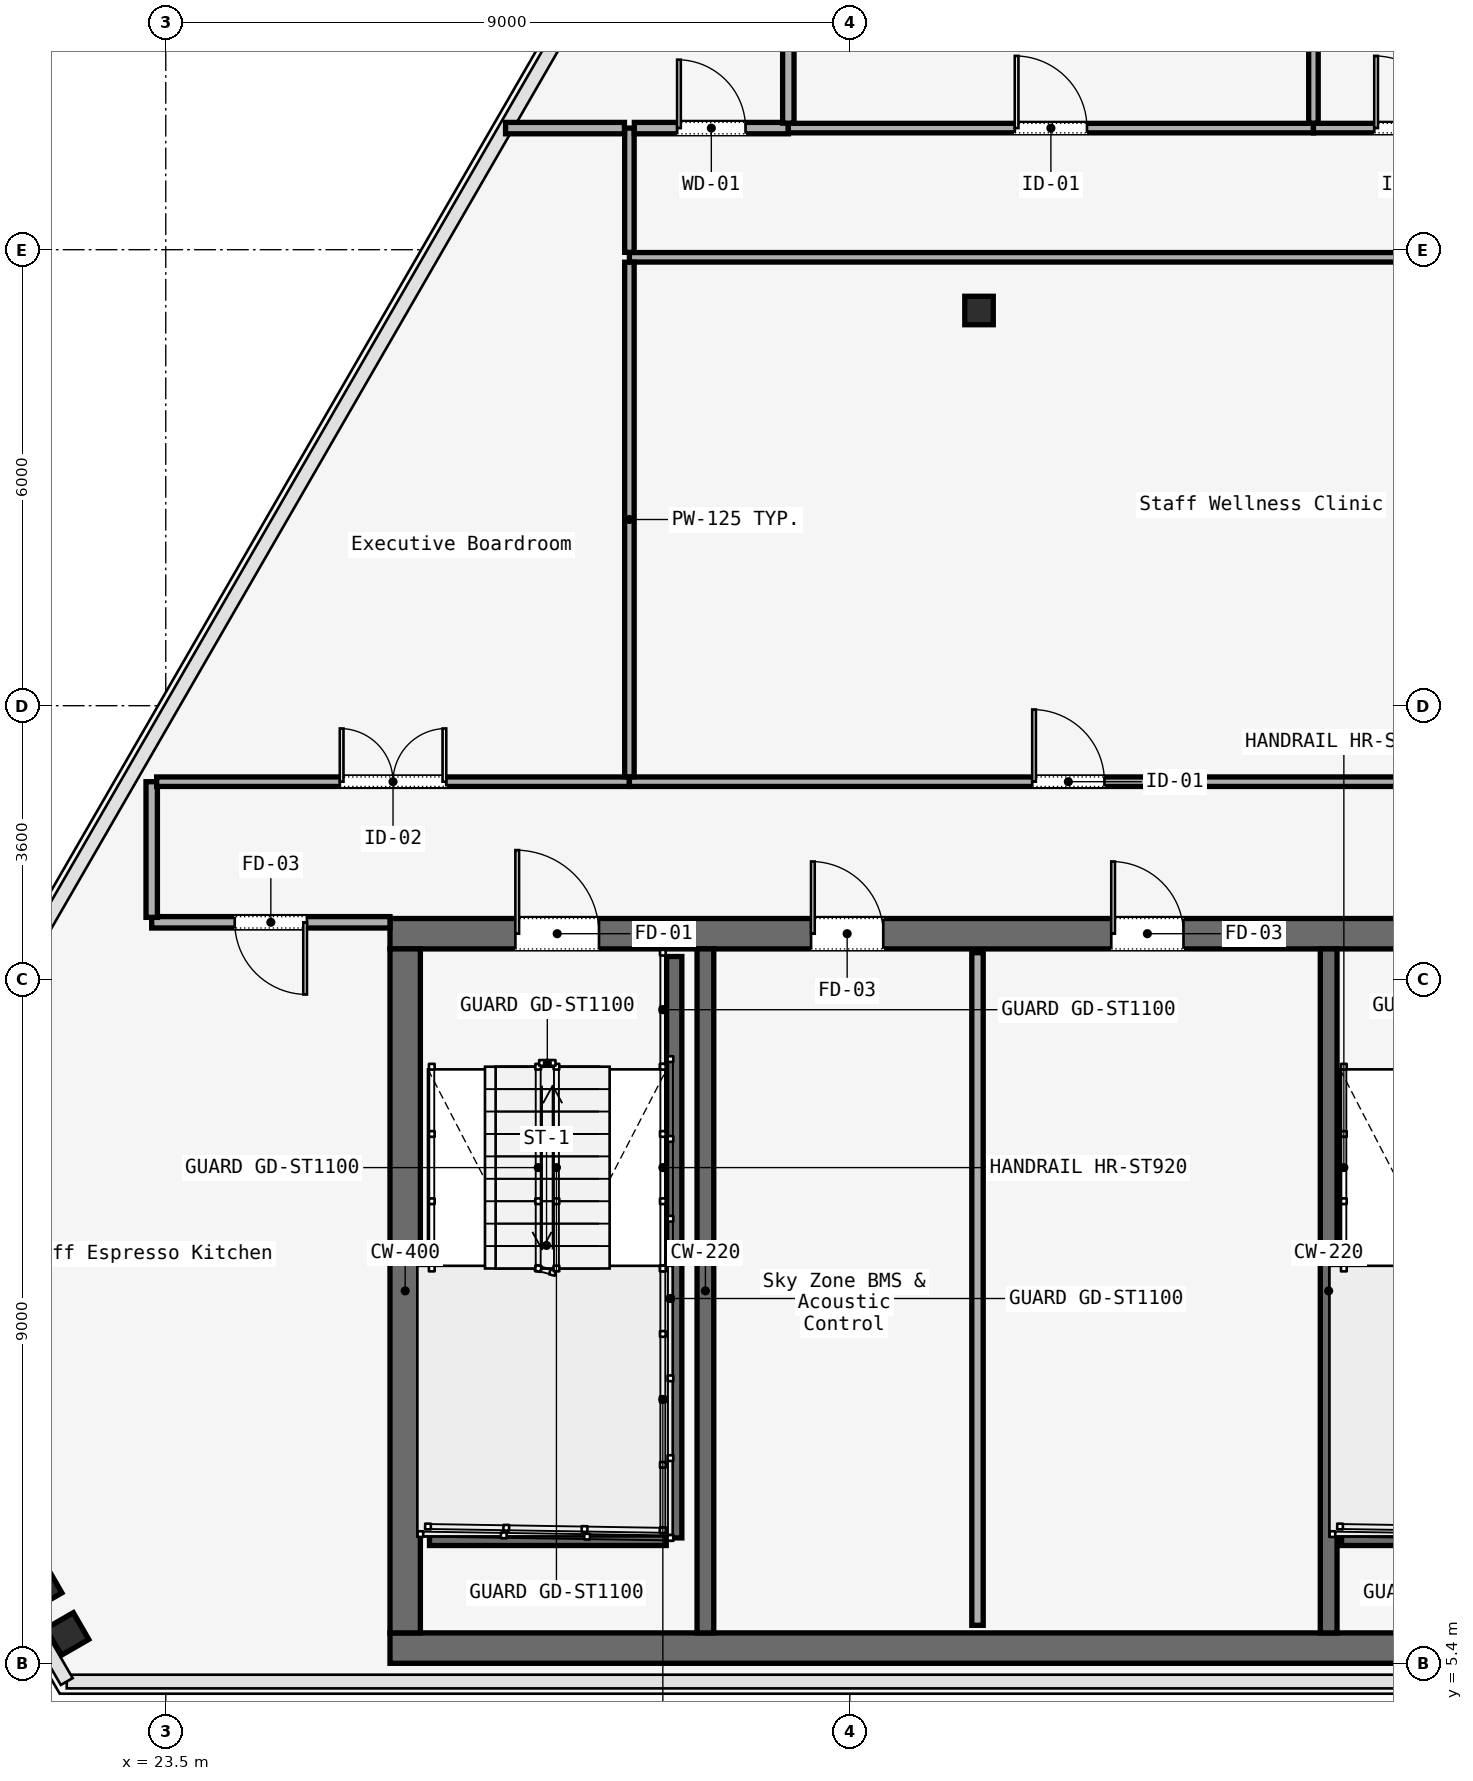
"""IFC4 building model, lengths in metres.
Left out: names, types, materials, properties, quantities, classifications, styles, units other than length and angle.
Written with IfcOpenShell. Run it as: python <this file> out.ifc"""

import sys

from ifc_helpers import new_model, si_unit, direction, frame, frame_2d, origin, origin_2d, place, context, subcontext, project, spatial, rectangle, i_section, extrude, element, fill, save


model = new_model("IFC4")
c1 = context("Model", 3, precision=1e-05, world=origin(), true_north=direction((0.0, 1.0)))
c2 = subcontext(c1, "Body", "Model", "MODEL_VIEW")
j1 = project(units=[si_unit("LENGTHUNIT", "METRE"), si_unit("PLANEANGLEUNIT", "RADIAN")], contexts=[c1])
p1 = place(None, origin())
s1 = spatial("IfcSite", under=j1, at=p1, CompositionType="ELEMENT")
p2 = place(p1, origin())
s2 = spatial("IfcBuilding", under=s1, at=p2, CompositionType="ELEMENT")
p3 = place(p2, frame((0.0, 0.0, 259.8)))
s3 = spatial("IfcBuildingStorey", under=s2, at=p3, CompositionType="ELEMENT", Elevation=259.8)
p4 = place(p3, frame((26.45, 15.0, 0.0), z_axis=(0.0, 0.0, 1.0), x_axis=(1.0, 0.0, 0.0)))
e1 = element("IfcWall", 1, at=p4, inside=s3, PredefinedType="SOLIDWALL", context=c2, shape_type="SweptSolid", body=[
    extrude(rectangle(XDim=31.1, YDim=0.4, at=frame_2d((15.55, 0.0))), origin(), (0.0, 0.0, 1.0), 3.58),
])
p5 = place(p4, frame((1.65, 0.0, 0.0)))
e2 = element("IfcOpeningElement", 2, at=p5, cuts=e1, PredefinedType="OPENING", context=c2, shape_type="SweptSolid", body=[
    extrude(rectangle(XDim=1.1, YDim=2.2, at=frame_2d((0.55, 1.1))), frame((0.0, 0.2, 0.0), z_axis=(0.0, -1.0, 0.0), x_axis=(1.0, 0.0, 0.0)), (0.0, 0.0, 1.0), 0.4),
])
p6 = place(p4, frame((13.65, 0.0, 0.0)))
e3 = element("IfcOpeningElement", 3, at=p6, cuts=e1, PredefinedType="OPENING", context=c2, shape_type="SweptSolid", body=[
    extrude(rectangle(XDim=1.1, YDim=2.2, at=frame_2d((0.55, 1.1))), frame((0.0, 0.2, 0.0), z_axis=(0.0, -1.0, 0.0), x_axis=(1.0, 0.0, 0.0)), (0.0, 0.0, 1.0), 0.4),
])
p7 = place(p4, frame((25.55, 0.0, 0.0)))
e4 = element("IfcOpeningElement", 4, at=p7, cuts=e1, PredefinedType="OPENING", context=c2, shape_type="SweptSolid", body=[
    extrude(rectangle(XDim=1.1, YDim=2.2, at=frame_2d((0.55, 1.1))), frame((0.0, 0.2, 0.0), z_axis=(0.0, -1.0, 0.0), x_axis=(1.0, 0.0, 0.0)), (0.0, 0.0, 1.0), 0.4),
])
p8 = place(p4, frame((19.35, 0.0, 0.0)))
e5 = element("IfcOpeningElement", 5, at=p8, cuts=e1, PredefinedType="OPENING", context=c2, shape_type="SweptSolid", body=[
    extrude(rectangle(XDim=1.1, YDim=2.2, at=frame_2d((0.55, 1.1))), frame((0.0, 0.2, 0.0), z_axis=(0.0, -1.0, 0.0), x_axis=(1.0, 0.0, 0.0)), (0.0, 0.0, 1.0), 0.4),
])
p9 = place(p4, frame((21.4, 0.0, 0.0)))
e6 = element("IfcOpeningElement", 6, at=p9, cuts=e1, PredefinedType="OPENING", context=c2, shape_type="SweptSolid", body=[
    extrude(rectangle(XDim=0.9, YDim=2.1, at=frame_2d((0.45, 1.05))), frame((0.0, 0.2, 0.0), z_axis=(0.0, -1.0, 0.0), x_axis=(1.0, 0.0, 0.0)), (0.0, 0.0, 1.0), 0.4),
])
p10 = place(p4, frame((5.54, 0.0, 0.0)))
e7 = element("IfcOpeningElement", 7, at=p10, cuts=e1, PredefinedType="OPENING", context=c2, shape_type="SweptSolid", body=[
    extrude(rectangle(XDim=0.95, YDim=2.2, at=frame_2d((0.475, 1.1))), frame((0.0, 0.2, 0.0), z_axis=(0.0, -1.0, 0.0), x_axis=(1.0, 0.0, 0.0)), (0.0, 0.0, 1.0), 0.4),
])
p11 = place(p4, frame((9.49, 0.0, 0.0)))
e8 = element("IfcOpeningElement", 8, at=p11, cuts=e1, PredefinedType="OPENING", context=c2, shape_type="SweptSolid", body=[
    extrude(rectangle(XDim=0.95, YDim=2.2, at=frame_2d((0.475, 1.1))), frame((0.0, 0.2, 0.0), z_axis=(0.0, -1.0, 0.0), x_axis=(1.0, 0.0, 0.0)), (0.0, 0.0, 1.0), 0.4),
])
p12 = place(p4, frame((23.35, 0.0, 0.0)))
e9 = element("IfcOpeningElement", 9, at=p12, cuts=e1, PredefinedType="OPENING", context=c2, shape_type="SweptSolid", body=[
    extrude(rectangle(XDim=1.3, YDim=2.3, at=frame_2d((0.65, 1.15))), frame((0.0, 0.2, 0.0), z_axis=(0.0, -1.0, 0.0), x_axis=(1.0, 0.0, 0.0)), (0.0, 0.0, 1.0), 0.4),
])
p13 = place(p3, frame((26.45, 5.6, 0.0), z_axis=(0.0, 0.0, 1.0), x_axis=(1.0, 0.0, 0.0)))
e10 = element("IfcWall", 10, at=p13, inside=s3, PredefinedType="SOLIDWALL", context=c2, shape_type="SweptSolid", body=[
    extrude(rectangle(XDim=31.1, YDim=0.4, at=frame_2d((15.55, 0.0))), origin(), (0.0, 0.0, 1.0), 3.58),
])
p14 = place(p3, frame((26.65, 5.8, 0.0), z_axis=(0.0, 0.0, 1.0), x_axis=(0.0, 1.0, 0.0)))
e11 = element("IfcWall", 11, at=p14, inside=s3, PredefinedType="SOLIDWALL", context=c2, shape_type="SweptSolid", body=[
    extrude(rectangle(XDim=9.0, YDim=0.4, at=frame_2d((4.5, 0.0))), origin(), (0.0, 0.0, 1.0), 3.58),
])
for number, where, z_axis, x_axis in (
    (12, (30.6, 5.8, 0.0), (0.0, 0.0, 1.0), (0.0, 1.0, 0.0)),
    (13, (38.8, 5.8, 0.0), (0.0, 0.0, 1.0), (0.0, 1.0, 0.0)),
):
    element("IfcWall", number, at=place(p3, frame(where, z_axis=z_axis, x_axis=x_axis)), inside=s3, PredefinedType="SOLIDWALL", context=c2, shape_type="SweptSolid", body=[
        extrude(rectangle(XDim=9.0, YDim=0.22, at=frame_2d((4.5, 0.0))), origin(), (0.0, 0.0, 1.0), 3.58),
    ])
p15 = place(p3, frame((34.2, 23.2, 0.0), z_axis=(0.0, 0.0, 1.0), x_axis=(1.0, 0.0, 0.0)))
e14 = element("IfcColumn", 14, at=p15, inside=s3, PredefinedType="COLUMN", context=c2, shape_type="SweptSolid", body=[
    extrude(i_section(OverallWidth=0.375, OverallDepth=0.375, WebThickness=0.017, FlangeThickness=0.027, FilletRadius=0.015, at=origin_2d()), origin(), (0.0, 0.0, 1.0), 3.58),
])
p16 = place(p3, frame((21.851, 6.399, 0.0), z_axis=(-0.012543459199, -0.025700457164, 0.999590990422), x_axis=(-0.069645069236, 0.997264345813, 0.024766689329)))
e15 = element("IfcColumn", 15, at=p16, inside=s3, PredefinedType="COLUMN", context=c2, shape_type="SweptSolid", body=[
    extrude(i_section(OverallWidth=0.406, OverallDepth=0.416, WebThickness=0.03, FlangeThickness=0.037, FilletRadius=0.015, at=origin_2d()), origin(), (0.0, 0.0, 1.0), 3.581),
])
p17 = place(p3, frame((22.205, 5.786, 0.0), z_axis=(-0.022499111872, -0.008522390861, 0.999710537515), x_axis=(0.632523877391, 0.774260559272, 0.020835807778)))
e16 = element("IfcColumn", 16, at=p17, inside=s3, PredefinedType="COLUMN", context=c2, shape_type="SweptSolid", body=[
    extrude(i_section(OverallWidth=0.406, OverallDepth=0.416, WebThickness=0.03, FlangeThickness=0.037, FilletRadius=0.015, at=origin_2d()), origin(), (0.0, 0.0, 1.0), 3.581),
])
p18 = place(p3, frame((30.19, 14.7, 0.0), z_axis=(0.0, 0.0, 1.0), x_axis=(0.0, -1.0, 0.0)))
e17 = element("IfcWall", 17, at=p18, inside=s3, PredefinedType="SOLIDWALL", context=c2, shape_type="SweptSolid", body=[
    extrude(rectangle(XDim=7.65, YDim=0.2, at=frame_2d((3.825, 0.0))), origin(), (0.0, 0.0, 1.0), 3.8),
])
for number, where, z_axis, x_axis in (
    (18, (26.97, 7.05, 0.0), (0.0, 0.0, 1.0), (1.0, 0.0, 0.0)),
    (19, (38.97, 7.05, 0.0), (0.0, 0.0, 1.0), (1.0, 0.0, 0.0)),
):
    element("IfcWall", number, at=place(p3, frame(where, z_axis=z_axis, x_axis=x_axis)), inside=s3, PredefinedType="SOLIDWALL", context=c2, shape_type="SweptSolid", body=[
        extrude(rectangle(XDim=3.115, YDim=0.2, at=frame_2d((1.558, 0.0))), origin(), (0.0, 0.0, 1.0), 3.8),
    ])
p19 = place(p3, frame((34.18, 5.9, 0.0), z_axis=(0.0, 0.0, 1.0), x_axis=(0.0, 1.0, 0.0)))
e20 = element("IfcWall", 20, at=p19, inside=s3, PredefinedType="PARTITIONING", context=c2, shape_type="SweptSolid", body=[
    extrude(rectangle(XDim=8.85, YDim=0.15, at=frame_2d((4.425, 0.0))), origin(), (0.0, 0.0, 1.0), 3.01),
])
p20 = place(p3, frame((26.45, 15.15, 0.0), z_axis=(0.0, 0.0, 1.0), x_axis=(-1.0, 0.0, 0.0)))
e21 = element("IfcWall", 21, at=p20, inside=s3, PredefinedType="PARTITIONING", context=c2, shape_type="SweptSolid", body=[
    extrude(rectangle(XDim=3.135, YDim=0.15, at=frame_2d((1.567, 0.0))), origin(), (0.0, 0.0, 1.0), 3.01),
])
p21 = place(p20, frame((1.093, 0.0, 0.0)))
e22 = element("IfcOpeningElement", 22, at=p21, cuts=e21, PredefinedType="OPENING", context=c2, shape_type="SweptSolid", body=[
    extrude(rectangle(XDim=0.95, YDim=2.2, at=frame_2d((0.475, 1.1))), frame((0.0, 0.075, 0.0), z_axis=(0.0, -1.0, 0.0), x_axis=(1.0, 0.0, 0.0)), (0.0, 0.0, 1.0), 0.15),
])
p22 = place(p3, frame((23.315, 15.215, 0.0), z_axis=(0.0, 0.0, 1.0), x_axis=(0.0, 1.0, 0.0)))
e23 = element("IfcWall", 23, at=p22, inside=s3, PredefinedType="PARTITIONING", context=c2, shape_type="SweptSolid", body=[
    extrude(rectangle(XDim=1.785, YDim=0.15, at=frame_2d((0.893, 0.0))), origin(), (0.0, 0.0, 1.0), 3.01),
])
p23 = place(p3, frame((23.38, 17.0, 0.0), z_axis=(0.0, 0.0, 1.0), x_axis=(1.0, 0.0, 0.0)))
e24 = element("IfcWall", 24, at=p23, inside=s3, PredefinedType="PARTITIONING", context=c2, shape_type="SweptSolid", body=[
    extrude(rectangle(XDim=6.22, YDim=0.125, at=frame_2d((3.11, 0.0))), origin(), (0.0, 0.0, 1.0), 3.01),
])
p24 = place(p23, frame((2.41, 0.0, 0.0)))
e25 = element("IfcOpeningElement", 25, at=p24, cuts=e24, PredefinedType="OPENING", context=c2, shape_type="SweptSolid", body=[
    extrude(rectangle(XDim=1.4, YDim=2.2, at=frame_2d((0.7, 1.1))), frame((0.0, 0.062, 0.0), z_axis=(0.0, -1.0, 0.0), x_axis=(1.0, 0.0, 0.0)), (0.0, 0.0, 1.0), 0.125),
])
p25 = place(p3, frame((29.6, 17.0, 0.0), z_axis=(0.0, 0.0, 1.0), x_axis=(1.0, 0.0, 0.0)))
e26 = element("IfcWall", 26, at=p25, inside=s3, PredefinedType="PARTITIONING", context=c2, shape_type="SweptSolid", body=[
    extrude(rectangle(XDim=11.55, YDim=0.125, at=frame_2d((5.775, 0.0))), origin(), (0.0, 0.0, 1.0), 3.01),
])
p26 = place(p25, frame((5.3, 0.0, 0.0)))
e27 = element("IfcOpeningElement", 27, at=p26, cuts=e26, PredefinedType="OPENING", context=c2, shape_type="SweptSolid", body=[
    extrude(rectangle(XDim=0.95, YDim=2.2, at=frame_2d((0.475, 1.1))), frame((0.0, 0.062, 0.0), z_axis=(0.0, -1.0, 0.0), x_axis=(1.0, 0.0, 0.0)), (0.0, 0.0, 1.0), 0.125),
])
p27 = place(p3, frame((41.085, 23.9, 0.0), z_axis=(0.0, 0.0, 1.0), x_axis=(-1.0, 0.0, 0.0)))
e28 = element("IfcWall", 28, at=p27, inside=s3, PredefinedType="PARTITIONING", context=c2, shape_type="SweptSolid", body=[
    extrude(rectangle(XDim=11.485, YDim=0.125, at=frame_2d((5.742, 0.0))), origin(), (0.0, 0.0, 1.0), 3.01),
])
p28 = place(p3, frame((29.6, 23.965, 0.0), z_axis=(0.0, 0.0, 1.0), x_axis=(0.0, 1.0, 0.0)))
e29 = element("IfcWall", 29, at=p28, inside=s3, PredefinedType="PARTITIONING", context=c2, shape_type="SweptSolid", body=[
    extrude(rectangle(XDim=1.635, YDim=0.125, at=frame_2d((0.817, 0.0))), origin(), (0.0, 0.0, 1.0), 3.01),
])
p29 = place(p3, frame((29.665, 25.6, 0.0), z_axis=(0.0, 0.0, 1.0), x_axis=(1.0, 0.0, 0.0)))
e30 = element("IfcWall", 30, at=p29, inside=s3, PredefinedType="PARTITIONING", context=c2, shape_type="SweptSolid", body=[
    extrude(rectangle(XDim=2.026, YDim=0.15, at=frame_2d((1.013, 0.0))), origin(), (0.0, 0.0, 1.0), 3.01),
])
p30 = place(p29, frame((0.563, 0.0, 0.0)))
e31 = element("IfcOpeningElement", 31, at=p30, cuts=e30, PredefinedType="OPENING", context=c2, shape_type="SweptSolid", body=[
    extrude(rectangle(XDim=0.9, YDim=2.15, at=frame_2d((0.45, 1.075))), frame((0.0, 0.075, 0.0), z_axis=(0.0, -1.0, 0.0), x_axis=(1.0, 0.0, 0.0)), (0.0, 0.0, 1.0), 0.15),
])
p31 = place(p3, frame((31.691, 25.6, 0.0), z_axis=(0.0, 0.0, 1.0), x_axis=(1.0, 0.0, 0.0)))
e32 = element("IfcWall", 32, at=p31, inside=s3, PredefinedType="PARTITIONING", context=c2, shape_type="SweptSolid", body=[
    extrude(rectangle(XDim=6.909, YDim=0.125, at=frame_2d((3.455, 0.0))), origin(), (0.0, 0.0, 1.0), 3.01),
])
p32 = place(p31, frame((2.979, 0.0, 0.0)))
e33 = element("IfcOpeningElement", 33, at=p32, cuts=e32, PredefinedType="OPENING", context=c2, shape_type="SweptSolid", body=[
    extrude(rectangle(XDim=0.95, YDim=2.2, at=frame_2d((0.475, 1.1))), frame((0.0, 0.062, 0.0), z_axis=(0.0, -1.0, 0.0), x_axis=(1.0, 0.0, 0.0)), (0.0, 0.0, 1.0), 0.125),
])
p33 = place(p3, frame((38.6, 25.6, 0.0), z_axis=(0.0, 0.0, 1.0), x_axis=(1.0, 0.0, 0.0)))
e34 = element("IfcWall", 34, at=p33, inside=s3, PredefinedType="PARTITIONING", context=c2, shape_type="SweptSolid", body=[
    extrude(rectangle(XDim=2.55, YDim=0.125, at=frame_2d((1.275, 0.0))), origin(), (0.0, 0.0, 1.0), 3.01),
])
p34 = place(p33, frame((0.8, 0.0, 0.0)))
e35 = element("IfcOpeningElement", 35, at=p34, cuts=e34, PredefinedType="OPENING", context=c2, shape_type="SweptSolid", body=[
    extrude(rectangle(XDim=0.95, YDim=2.2, at=frame_2d((0.475, 1.1))), frame((0.0, 0.062, 0.0), z_axis=(0.0, -1.0, 0.0), x_axis=(1.0, 0.0, 0.0)), (0.0, 0.0, 1.0), 0.125),
])
p35 = place(p3, frame((29.6, 23.835, 0.0), z_axis=(0.0, 0.0, 1.0), x_axis=(0.0, -1.0, 0.0)))
e36 = element("IfcWall", 36, at=p35, inside=s3, PredefinedType="PARTITIONING", context=c2, shape_type="SweptSolid", body=[
    extrude(rectangle(XDim=6.77, YDim=0.125, at=frame_2d((3.385, 0.0))), origin(), (0.0, 0.0, 1.0), 3.01),
])
p36 = place(p3, frame((27.971, 25.6, 0.0), z_axis=(0.0, 0.0, 1.0), x_axis=(1.0, 0.0, 0.0)))
e37 = element("IfcWall", 37, at=p36, inside=s3, PredefinedType="PARTITIONING", context=c2, shape_type="SweptSolid", body=[
    extrude(rectangle(XDim=1.564, YDim=0.15, at=frame_2d((0.782, 0.0))), origin(), (0.0, 0.0, 1.0), 3.01),
])
p37 = place(p3, frame((31.691, 32.044, 0.0), z_axis=(0.0, 0.0, 1.0), x_axis=(0.0, -1.0, 0.0)))
e38 = element("IfcWall", 38, at=p37, inside=s3, PredefinedType="PARTITIONING", context=c2, shape_type="SweptSolid", body=[
    extrude(rectangle(XDim=6.379, YDim=0.15, at=frame_2d((3.189, 0.0))), origin(), (0.0, 0.0, 1.0), 3.01),
])
p38 = place(p3, frame((38.6, 44.01, 0.0), z_axis=(0.0, 0.0, 1.0), x_axis=(0.0, -1.0, 0.0)))
e39 = element("IfcWall", 39, at=p38, inside=s3, PredefinedType="PARTITIONING", context=c2, shape_type="SweptSolid", body=[
    extrude(rectangle(XDim=18.345, YDim=0.125, at=frame_2d((9.173, 0.0))), origin(), (0.0, 0.0, 1.0), 3.01),
])
p39 = place(p5, origin())
e40 = element("IfcDoor", 40, at=p39, inside=s3, OperationType="SINGLE_SWING_RIGHT", PredefinedType="DOOR", context=c2, shape_type="SweptSolid", body=[
    extrude(rectangle(XDim=1.1, YDim=2.2, at=frame_2d((0.55, 1.1))), frame((0.0, 0.025, 0.0), z_axis=(0.0, -1.0, 0.0), x_axis=(1.0, 0.0, 0.0)), (0.0, 0.0, 1.0), 0.05),
])
fill(e2, e40)
p40 = place(p10, origin())
e41 = element("IfcDoor", 41, at=p40, inside=s3, OperationType="SINGLE_SWING_LEFT", PredefinedType="DOOR", context=c2, shape_type="SweptSolid", body=[
    extrude(rectangle(XDim=0.95, YDim=2.2, at=frame_2d((0.475, 1.1))), frame((0.0, 0.025, 0.0), z_axis=(0.0, -1.0, 0.0), x_axis=(1.0, 0.0, 0.0)), (0.0, 0.0, 1.0), 0.05),
])
fill(e7, e41)
p41 = place(p11, origin())
e42 = element("IfcDoor", 42, at=p41, inside=s3, OperationType="SINGLE_SWING_RIGHT", PredefinedType="DOOR", context=c2, shape_type="SweptSolid", body=[
    extrude(rectangle(XDim=0.95, YDim=2.2, at=frame_2d((0.475, 1.1))), frame((0.0, 0.025, 0.0), z_axis=(0.0, -1.0, 0.0), x_axis=(1.0, 0.0, 0.0)), (0.0, 0.0, 1.0), 0.05),
])
fill(e8, e42)
p42 = place(p21, origin())
e43 = element("IfcDoor", 43, at=p42, inside=s3, OperationType="SINGLE_SWING_RIGHT", PredefinedType="DOOR", context=c2, shape_type="SweptSolid", body=[
    extrude(rectangle(XDim=0.95, YDim=2.2, at=frame_2d((0.475, 1.1))), frame((0.0, 0.025, 0.0), z_axis=(0.0, -1.0, 0.0), x_axis=(1.0, 0.0, 0.0)), (0.0, 0.0, 1.0), 0.05),
])
fill(e22, e43)
p43 = place(p24, origin())
e44 = element("IfcDoor", 44, at=p43, inside=s3, OperationType="SINGLE_SWING_RIGHT", PredefinedType="DOOR", context=c2, shape_type="SweptSolid", body=[
    extrude(rectangle(XDim=1.4, YDim=2.2, at=frame_2d((0.7, 1.1))), frame((0.0, 0.025, 0.0), z_axis=(0.0, -1.0, 0.0), x_axis=(1.0, 0.0, 0.0)), (0.0, 0.0, 1.0), 0.05),
])
fill(e25, e44)
p44 = place(p26, origin())
e45 = element("IfcDoor", 45, at=p44, inside=s3, OperationType="SINGLE_SWING_LEFT", PredefinedType="DOOR", context=c2, shape_type="SweptSolid", body=[
    extrude(rectangle(XDim=0.95, YDim=2.2, at=frame_2d((0.475, 1.1))), frame((0.0, 0.025, 0.0), z_axis=(0.0, -1.0, 0.0), x_axis=(1.0, 0.0, 0.0)), (0.0, 0.0, 1.0), 0.05),
])
fill(e27, e45)
p45 = place(p30, origin())
e46 = element("IfcDoor", 46, at=p45, inside=s3, OperationType="SINGLE_SWING_RIGHT", PredefinedType="DOOR", context=c2, shape_type="SweptSolid", body=[
    extrude(rectangle(XDim=0.9, YDim=2.15, at=frame_2d((0.45, 1.075))), frame((0.0, 0.025, 0.0), z_axis=(0.0, -1.0, 0.0), x_axis=(1.0, 0.0, 0.0)), (0.0, 0.0, 1.0), 0.05),
])
fill(e31, e46)
p46 = place(p32, origin())
e47 = element("IfcDoor", 47, at=p46, inside=s3, OperationType="SINGLE_SWING_RIGHT", PredefinedType="DOOR", context=c2, shape_type="SweptSolid", body=[
    extrude(rectangle(XDim=0.95, YDim=2.2, at=frame_2d((0.475, 1.1))), frame((0.0, 0.025, 0.0), z_axis=(0.0, -1.0, 0.0), x_axis=(1.0, 0.0, 0.0)), (0.0, 0.0, 1.0), 0.05),
])
fill(e33, e47)
p47 = place(p34, origin())
e48 = element("IfcDoor", 48, at=p47, inside=s3, OperationType="SINGLE_SWING_LEFT", PredefinedType="DOOR", context=c2, shape_type="SweptSolid", body=[
    extrude(rectangle(XDim=0.95, YDim=2.2, at=frame_2d((0.475, 1.1))), frame((0.0, 0.025, 0.0), z_axis=(0.0, -1.0, 0.0), x_axis=(1.0, 0.0, 0.0)), (0.0, 0.0, 1.0), 0.05),
])
fill(e35, e48)
save(model, sys.argv[1])
